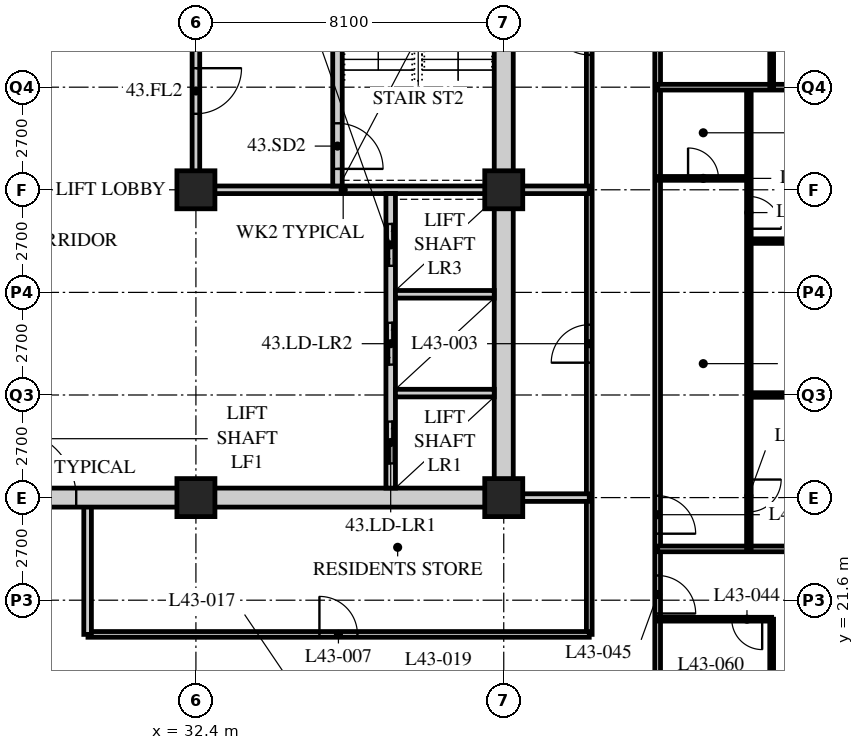
"""IFC4 building model, lengths in metres.
Left out: names, types, materials, properties, quantities, classifications, styles, units other than length and angle.
Written with IfcOpenShell. Run it as: python <this file> out.ifc"""

import sys

from ifc_helpers import new_model, si_unit, direction, frame, frame_2d, origin, origin_2d, place, context, subcontext, project, spatial, rectangle, hollow_rectangle, extrude, element, fill, save


model = new_model("IFC4")
c1 = context("Model", 3, precision=1e-05, world=origin(), true_north=direction((0.0, 1.0)))
c2 = subcontext(c1, "Body", "Model", "MODEL_VIEW")
j1 = project(units=[si_unit("LENGTHUNIT", "METRE"), si_unit("PLANEANGLEUNIT", "RADIAN")], contexts=[c1])
p1 = place(None, origin())
s1 = spatial("IfcSite", under=j1, at=p1, CompositionType="ELEMENT")
p2 = place(p1, origin())
s2 = spatial("IfcBuilding", under=s1, at=p2, CompositionType="ELEMENT")
p3 = place(p2, frame((0.0, 0.0, 170.4)))
s3 = spatial("IfcBuildingStorey", under=s2, at=p3, CompositionType="ELEMENT", Elevation=170.4)
for number, where, z_axis, x_axis in (
    (1, (32.4, 24.3, 0.0), (0.0, 0.0, 1.0), (1.0, 0.0, 0.0)),
    (2, (32.4, 32.4, 0.0), (0.0, 0.0, 1.0), (1.0, 0.0, 0.0)),
    (3, (40.5, 24.3, 0.0), (0.0, 0.0, 1.0), (1.0, 0.0, 0.0)),
    (4, (40.5, 32.4, 0.0), (0.0, 0.0, 1.0), (1.0, 0.0, 0.0)),
):
    element("IfcColumn", number, at=place(p3, frame(where, z_axis=z_axis, x_axis=x_axis)), inside=s3, PredefinedType="COLUMN", context=c2, shape_type="SweptSolid", body=[
        extrude(hollow_rectangle(XDim=1.0, YDim=1.0, WallThickness=0.1, at=origin_2d()), origin(), (0.0, 0.0, 1.0), 3.6),
    ])
p4 = place(p3, frame((44.55, 18.9, 0.0), z_axis=(0.0, 0.0, 1.0), x_axis=(0.0, 1.0, 0.0)))
e5 = element("IfcWall", 5, at=p4, inside=s3, PredefinedType="PARTITIONING", context=c2, shape_type="SweptSolid", body=[
    extrude(rectangle(XDim=24.3, YDim=0.15, at=frame_2d((12.15, 0.0))), origin(), (0.0, 0.0, 1.0), 3.39),
])
p5 = place(p4, frame((2.35, 0.0, 0.0)))
e6 = element("IfcOpeningElement", 6, at=p5, cuts=e5, PredefinedType="OPENING", context=c2, shape_type="SweptSolid", body=[
    extrude(rectangle(XDim=1.0, YDim=2.1, at=frame_2d((0.5, 1.05))), frame((0.0, 0.085, 0.0), z_axis=(0.0, -1.0, 0.0), x_axis=(1.0, 0.0, 0.0)), (0.0, 0.0, 1.0), 0.17),
])
p6 = place(p4, frame((4.45, 0.0, 0.0)))
e7 = element("IfcOpeningElement", 7, at=p6, cuts=e5, PredefinedType="OPENING", context=c2, shape_type="SweptSolid", body=[
    extrude(rectangle(XDim=1.0, YDim=2.1, at=frame_2d((0.5, 1.05))), frame((0.0, 0.085, 0.0), z_axis=(0.0, -1.0, 0.0), x_axis=(1.0, 0.0, 0.0)), (0.0, 0.0, 1.0), 0.17),
])
p7 = place(p4, frame((18.55, 0.0, 0.0)))
e8 = element("IfcOpeningElement", 8, at=p7, cuts=e5, PredefinedType="OPENING", context=c2, shape_type="SweptSolid", body=[
    extrude(rectangle(XDim=1.0, YDim=2.1, at=frame_2d((0.5, 1.05))), frame((0.0, 0.085, 0.0), z_axis=(0.0, -1.0, 0.0), x_axis=(1.0, 0.0, 0.0)), (0.0, 0.0, 1.0), 0.17),
])
p8 = place(p4, frame((22.6, 0.0, 0.0)))
e9 = element("IfcOpeningElement", 9, at=p8, cuts=e5, PredefinedType="OPENING", context=c2, shape_type="SweptSolid", body=[
    extrude(rectangle(XDim=1.0, YDim=2.1, at=frame_2d((0.5, 1.05))), frame((0.0, 0.085, 0.0), z_axis=(0.0, -1.0, 0.0), x_axis=(1.0, 0.0, 0.0)), (0.0, 0.0, 1.0), 0.17),
])
p9 = place(p3, frame((42.75, 20.7, 0.0), z_axis=(0.0, 0.0, 1.0), x_axis=(0.0, 1.0, 0.0)))
e10 = element("IfcWall", 10, at=p9, inside=s3, PredefinedType="PARTITIONING", context=c2, shape_type="SweptSolid", body=[
    extrude(rectangle(XDim=19.8, YDim=0.15, at=frame_2d((9.9, 0.0))), origin(), (0.0, 0.0, 1.0), 3.39),
])
p10 = place(p9, frame((7.15, 0.0, 0.0)))
e11 = element("IfcOpeningElement", 11, at=p10, cuts=e10, PredefinedType="OPENING", context=c2, shape_type="SweptSolid", body=[
    extrude(rectangle(XDim=1.0, YDim=2.1, at=frame_2d((0.5, 1.05))), frame((0.0, 0.085, 0.0), z_axis=(0.0, -1.0, 0.0), x_axis=(1.0, 0.0, 0.0)), (0.0, 0.0, 1.0), 0.17),
])
p11 = place(p9, frame((15.25, 0.0, 0.0)))
e12 = element("IfcOpeningElement", 12, at=p11, cuts=e10, PredefinedType="OPENING", context=c2, shape_type="SweptSolid", body=[
    extrude(rectangle(XDim=1.0, YDim=2.1, at=frame_2d((0.5, 1.05))), frame((0.0, 0.085, 0.0), z_axis=(0.0, -1.0, 0.0), x_axis=(1.0, 0.0, 0.0)), (0.0, 0.0, 1.0), 0.17),
])
p12 = place(p3, frame((29.56, 20.7, 0.0), z_axis=(0.0, 0.0, 1.0), x_axis=(1.0, 0.0, 0.0)))
e13 = element("IfcWall", 13, at=p12, inside=s3, PredefinedType="PARTITIONING", context=c2, shape_type="SweptSolid", body=[
    extrude(rectangle(XDim=13.19, YDim=0.15, at=frame_2d((6.595, 0.0))), origin(), (0.0, 0.0, 1.0), 3.39),
])
p13 = place(p12, frame((6.09, 0.0, 0.0)))
e14 = element("IfcOpeningElement", 14, at=p13, cuts=e13, PredefinedType="OPENING", context=c2, shape_type="SweptSolid", body=[
    extrude(rectangle(XDim=1.0, YDim=2.1, at=frame_2d((0.5, 1.05))), frame((0.0, 0.085, 0.0), z_axis=(0.0, -1.0, 0.0), x_axis=(1.0, 0.0, 0.0)), (0.0, 0.0, 1.0), 0.17),
])
p14 = place(p3, frame((40.5, 32.4, 0.0), z_axis=(0.0, 0.0, 1.0), x_axis=(1.0, 0.0, 0.0)))
e15 = element("IfcWall", 15, at=p14, inside=s3, PredefinedType="SOLIDWALL", context=c2, shape_type="SweptSolid", body=[
    extrude(rectangle(XDim=2.25, YDim=0.2, at=frame_2d((1.125, 0.0))), origin(), (0.0, 0.0, 1.0), 3.39),
])
p15 = place(p3, frame((29.55, 20.7, 0.0), z_axis=(0.0, 0.0, 1.0), x_axis=(0.0, 1.0, 0.0)))
e16 = element("IfcWall", 16, at=p15, inside=s3, PredefinedType="SOLIDWALL", context=c2, shape_type="SweptSolid", body=[
    extrude(rectangle(XDim=3.6, YDim=0.2, at=frame_2d((1.8, 0.0))), origin(), (0.0, 0.0, 1.0), 3.39),
])
p16 = place(p3, frame((40.5, 24.3, 0.0), z_axis=(0.0, 0.0, 1.0), x_axis=(1.0, 0.0, 0.0)))
e17 = element("IfcWall", 17, at=p16, inside=s3, PredefinedType="SOLIDWALL", context=c2, shape_type="SweptSolid", body=[
    extrude(rectangle(XDim=2.25, YDim=0.2, at=frame_2d((1.125, 0.0))), origin(), (0.0, 0.0, 1.0), 3.39),
])
p17 = place(p3, frame((47.55, 18.9, 0.0), z_axis=(0.0, 0.0, 1.0), x_axis=(0.0, 1.0, 0.0)))
e18 = element("IfcWall", 18, at=p17, inside=s3, PredefinedType="PARTITIONING", context=c2, shape_type="SweptSolid", body=[
    extrude(rectangle(XDim=2.2, YDim=0.1, at=frame_2d((1.1, 0.0))), origin(), (0.0, 0.0, 1.0), 3.39),
])
p18 = place(p3, frame((44.55, 21.1, 0.0), z_axis=(0.0, 0.0, 1.0), x_axis=(1.0, 0.0, 0.0)))
e19 = element("IfcWall", 19, at=p18, inside=s3, PredefinedType="PARTITIONING", context=c2, shape_type="SweptSolid", body=[
    extrude(rectangle(XDim=3.0, YDim=0.1, at=frame_2d((1.5, 0.0))), origin(), (0.0, 0.0, 1.0), 3.39),
])
p19 = place(p18, frame((1.95, 0.0, 0.0)))
e20 = element("IfcOpeningElement", 20, at=p19, cuts=e19, PredefinedType="OPENING", context=c2, shape_type="SweptSolid", body=[
    extrude(rectangle(XDim=0.8, YDim=2.1, at=frame_2d((0.4, 1.05))), frame((0.0, 0.06, 0.0), z_axis=(0.0, -1.0, 0.0), x_axis=(1.0, 0.0, 0.0)), (0.0, 0.0, 1.0), 0.12),
])
p20 = place(p3, frame((44.55, 22.95, 0.0), z_axis=(0.0, 0.0, 1.0), x_axis=(1.0, 0.0, 0.0)))
e21 = element("IfcWall", 21, at=p20, inside=s3, PredefinedType="PARTITIONING", context=c2, shape_type="SweptSolid", body=[
    extrude(rectangle(XDim=11.85, YDim=0.15, at=frame_2d((5.925, 0.0))), origin(), (0.0, 0.0, 1.0), 3.39),
])
p21 = place(p3, frame((46.95, 22.95, 0.0), z_axis=(0.0, 0.0, 1.0), x_axis=(0.0, 1.0, 0.0)))
e22 = element("IfcWall", 22, at=p21, inside=s3, PredefinedType="PARTITIONING", context=c2, shape_type="SweptSolid", body=[
    extrude(rectangle(XDim=12.15, YDim=0.12, at=frame_2d((6.075, 0.0))), origin(), (0.0, 0.0, 1.0), 3.39),
])
p22 = place(p21, frame((0.975, 0.0, 0.0)))
e23 = element("IfcOpeningElement", 23, at=p22, cuts=e22, PredefinedType="OPENING", context=c2, shape_type="SweptSolid", body=[
    extrude(rectangle(XDim=0.85, YDim=2.1, at=frame_2d((0.425, 1.05))), frame((0.0, 0.07, 0.0), z_axis=(0.0, -1.0, 0.0), x_axis=(1.0, 0.0, 0.0)), (0.0, 0.0, 1.0), 0.14),
])
p23 = place(p21, frame((8.425, 0.0, 0.0)))
e24 = element("IfcOpeningElement", 24, at=p23, cuts=e22, PredefinedType="OPENING", context=c2, shape_type="SweptSolid", body=[
    extrude(rectangle(XDim=0.85, YDim=2.1, at=frame_2d((0.425, 1.05))), frame((0.0, 0.07, 0.0), z_axis=(0.0, -1.0, 0.0), x_axis=(1.0, 0.0, 0.0)), (0.0, 0.0, 1.0), 0.14),
])
p24 = place(p3, frame((44.55, 32.7, 0.0), z_axis=(0.0, 0.0, 1.0), x_axis=(1.0, 0.0, 0.0)))
e25 = element("IfcWall", 25, at=p24, inside=s3, PredefinedType="PARTITIONING", context=c2, shape_type="SweptSolid", body=[
    extrude(rectangle(XDim=2.4, YDim=0.1, at=frame_2d((1.2, 0.0))), origin(), (0.0, 0.0, 1.0), 3.39),
])
p25 = place(p24, frame((0.8, 0.0, 0.0)))
e26 = element("IfcOpeningElement", 26, at=p25, cuts=e25, PredefinedType="OPENING", context=c2, shape_type="SweptSolid", body=[
    extrude(rectangle(XDim=0.8, YDim=2.1, at=frame_2d((0.4, 1.05))), frame((0.0, 0.06, 0.0), z_axis=(0.0, -1.0, 0.0), x_axis=(1.0, 0.0, 0.0)), (0.0, 0.0, 1.0), 0.12),
])
p26 = place(p3, frame((46.95, 31.05, 0.0), z_axis=(0.0, 0.0, 1.0), x_axis=(1.0, 0.0, 0.0)))
e27 = element("IfcWall", 27, at=p26, inside=s3, PredefinedType="PARTITIONING", context=c2, shape_type="SweptSolid", body=[
    extrude(rectangle(XDim=9.45, YDim=0.12, at=frame_2d((4.725, 0.0))), origin(), (0.0, 0.0, 1.0), 3.39),
])
p27 = place(p3, frame((44.55, 35.1, 0.0), z_axis=(0.0, 0.0, 1.0), x_axis=(1.0, 0.0, 0.0)))
e28 = element("IfcWall", 28, at=p27, inside=s3, PredefinedType="PARTITIONING", context=c2, shape_type="SweptSolid", body=[
    extrude(rectangle(XDim=11.85, YDim=0.15, at=frame_2d((5.925, 0.0))), origin(), (0.0, 0.0, 1.0), 2.778),
])
p28 = place(p3, frame((47.55, 35.1, 0.0), z_axis=(0.0, 0.0, 1.0), x_axis=(0.0, 1.0, 0.0)))
e29 = element("IfcWall", 29, at=p28, inside=s3, PredefinedType="PARTITIONING", context=c2, shape_type="SweptSolid", body=[
    extrude(rectangle(XDim=2.2, YDim=0.1, at=frame_2d((1.1, 0.0))), origin(), (0.0, 0.0, 1.0), 3.39),
])
p29 = place(p3, frame((46.95, 27.0, 0.0), z_axis=(0.0, 0.0, 1.0), x_axis=(1.0, 0.0, 0.0)))
e30 = element("IfcWall", 30, at=p29, inside=s3, PredefinedType="PARTITIONING", context=c2, shape_type="SweptSolid", body=[
    extrude(rectangle(XDim=1.25, YDim=0.12, at=frame_2d((0.625, 0.0))), origin(), (0.0, 0.0, 1.0), 2.778),
])
p30 = place(p3, frame((15.95, 24.3, 0.0), z_axis=(0.0, 0.0, 1.0), x_axis=(1.0, 0.0, 0.0)))
e31 = element("IfcWall", 31, at=p30, inside=s3, PredefinedType="SOLIDWALL", context=c2, shape_type="SweptSolid", body=[
    extrude(rectangle(XDim=24.8, YDim=0.5, at=frame_2d((12.4, 0.0))), origin(), (0.0, 0.0, 1.0), 2.74),
])
p31 = place(p30, frame((11.5, 0.0, 0.0)))
e32 = element("IfcOpeningElement", 32, at=p31, cuts=e31, PredefinedType="OPENING", context=c2, shape_type="SweptSolid", body=[
    extrude(rectangle(XDim=1.8, YDim=2.4, at=frame_2d((0.9, 1.2))), frame((0.0, 0.26, 0.0), z_axis=(0.0, -1.0, 0.0), x_axis=(1.0, 0.0, 0.0)), (0.0, 0.0, 1.0), 0.52),
])
p32 = place(p3, frame((40.5, 24.55, 0.0), z_axis=(0.0, 0.0, 1.0), x_axis=(0.0, 1.0, 0.0)))
e33 = element("IfcWall", 33, at=p32, inside=s3, PredefinedType="SOLIDWALL", context=c2, shape_type="SweptSolid", body=[
    extrude(rectangle(XDim=15.7, YDim=0.5, at=frame_2d((7.85, 0.0))), origin(), (0.0, 0.0, 1.0), 2.778),
])
p33 = place(p3, frame((32.3, 32.4, 0.0), z_axis=(0.0, 0.0, 1.0), x_axis=(1.0, 0.0, 0.0)))
e34 = element("IfcWall", 34, at=p33, inside=s3, PredefinedType="SOLIDWALL", context=c2, shape_type="SweptSolid", body=[
    extrude(rectangle(XDim=7.95, YDim=0.2, at=frame_2d((3.975, 0.0))), origin(), (0.0, 0.0, 1.0), 2.778),
])
p34 = place(p3, frame((32.4, 32.5, 0.0), z_axis=(0.0, 0.0, 1.0), x_axis=(0.0, 1.0, 0.0)))
e35 = element("IfcWall", 35, at=p34, inside=s3, PredefinedType="SOLIDWALL", context=c2, shape_type="SweptSolid", body=[
    extrude(rectangle(XDim=7.75, YDim=0.2, at=frame_2d((3.875, 0.0))), origin(), (0.0, 0.0, 1.0), 2.778),
])
p35 = place(p34, frame((1.9, 0.0, 0.0)))
e36 = element("IfcOpeningElement", 36, at=p35, cuts=e35, PredefinedType="OPENING", context=c2, shape_type="SweptSolid", body=[
    extrude(rectangle(XDim=1.2, YDim=2.1, at=frame_2d((0.6, 1.05))), frame((0.0, 0.11, 0.0), z_axis=(0.0, -1.0, 0.0), x_axis=(1.0, 0.0, 0.0)), (0.0, 0.0, 1.0), 0.22),
])
p36 = place(p3, frame((37.525, 24.55, 0.0), z_axis=(0.0, 0.0, 1.0), x_axis=(0.0, 1.0, 0.0)))
e37 = element("IfcWall", 37, at=p36, inside=s3, PredefinedType="SOLIDWALL", context=c2, shape_type="SweptSolid", body=[
    extrude(rectangle(XDim=7.75, YDim=0.25, at=frame_2d((3.875, 0.0))), origin(), (0.0, 0.0, 1.0), 3.39),
])
p37 = place(p36, frame((0.65, 0.0, 0.0)))
e38 = element("IfcOpeningElement", 38, at=p37, cuts=e37, PredefinedType="OPENING", context=c2, shape_type="SweptSolid", body=[
    extrude(rectangle(XDim=1.1, YDim=2.4, at=frame_2d((0.55, 1.2))), frame((0.0, 0.135, 0.0), z_axis=(0.0, -1.0, 0.0), x_axis=(1.0, 0.0, 0.0)), (0.0, 0.0, 1.0), 0.27),
])
p38 = place(p36, frame((3.25, 0.0, 0.0)))
e39 = element("IfcOpeningElement", 39, at=p38, cuts=e37, PredefinedType="OPENING", context=c2, shape_type="SweptSolid", body=[
    extrude(rectangle(XDim=1.1, YDim=2.4, at=frame_2d((0.55, 1.2))), frame((0.0, 0.135, 0.0), z_axis=(0.0, -1.0, 0.0), x_axis=(1.0, 0.0, 0.0)), (0.0, 0.0, 1.0), 0.27),
])
p39 = place(p36, frame((5.85, 0.0, 0.0)))
e40 = element("IfcOpeningElement", 40, at=p39, cuts=e37, PredefinedType="OPENING", context=c2, shape_type="SweptSolid", body=[
    extrude(rectangle(XDim=1.1, YDim=2.4, at=frame_2d((0.55, 1.2))), frame((0.0, 0.135, 0.0), z_axis=(0.0, -1.0, 0.0), x_axis=(1.0, 0.0, 0.0)), (0.0, 0.0, 1.0), 0.27),
])
for number, where, z_axis, x_axis in (
    (41, (37.65, 27.05, 0.0), (0.0, 0.0, 1.0), (1.0, 0.0, 0.0)),
    (42, (37.65, 29.65, 0.0), (0.0, 0.0, 1.0), (1.0, 0.0, 0.0)),
):
    element("IfcWall", number, at=place(p3, frame(where, z_axis=z_axis, x_axis=x_axis)), inside=s3, PredefinedType="SOLIDWALL", context=c2, shape_type="SweptSolid", body=[
        extrude(rectangle(XDim=2.6, YDim=0.2, at=frame_2d((1.3, 0.0))), origin(), (0.0, 0.0, 1.0), 3.39),
    ])
p40 = place(p3, frame((36.125, 32.5, 0.0), z_axis=(0.0, 0.0, 1.0), x_axis=(0.0, 1.0, 0.0)))
e43 = element("IfcWall", 43, at=p40, inside=s3, PredefinedType="SOLIDWALL", context=c2, shape_type="SweptSolid", body=[
    extrude(rectangle(XDim=7.75, YDim=0.25, at=frame_2d((3.875, 0.0))), origin(), (0.0, 0.0, 1.0), 3.39),
])
p41 = place(p40, frame((0.45, 0.0, 0.0)))
e44 = element("IfcOpeningElement", 44, at=p41, cuts=e43, PredefinedType="OPENING", context=c2, shape_type="SweptSolid", body=[
    extrude(rectangle(XDim=1.2, YDim=2.1, at=frame_2d((0.6, 1.05))), frame((0.0, 0.135, 0.0), z_axis=(0.0, -1.0, 0.0), x_axis=(1.0, 0.0, 0.0)), (0.0, 0.0, 1.0), 0.27),
])
p42 = place(p10, origin())
e45 = element("IfcDoor", 45, at=p42, inside=s3, OperationType="SINGLE_SWING_LEFT", PredefinedType="DOOR", context=c2, shape_type="SweptSolid", body=[
    extrude(rectangle(XDim=1.0, YDim=2.1, at=frame_2d((0.5, 1.05))), frame((0.0, 0.025, 0.0), z_axis=(0.0, -1.0, 0.0), x_axis=(1.0, 0.0, 0.0)), (0.0, 0.0, 1.0), 0.05),
])
fill(e11, e45)
p43 = place(p11, origin())
e46 = element("IfcDoor", 46, at=p43, inside=s3, OperationType="SINGLE_SWING_RIGHT", PredefinedType="DOOR", context=c2, shape_type="SweptSolid", body=[
    extrude(rectangle(XDim=1.0, YDim=2.1, at=frame_2d((0.5, 1.05))), frame((0.0, 0.025, 0.0), z_axis=(0.0, -1.0, 0.0), x_axis=(1.0, 0.0, 0.0)), (0.0, 0.0, 1.0), 0.05),
])
fill(e12, e46)
p44 = place(p13, origin())
e47 = element("IfcDoor", 47, at=p44, inside=s3, OperationType="SINGLE_SWING_LEFT", PredefinedType="DOOR", context=c2, shape_type="SweptSolid", body=[
    extrude(rectangle(XDim=1.0, YDim=2.1, at=frame_2d((0.5, 1.05))), frame((0.0, 0.025, 0.0), z_axis=(0.0, -1.0, 0.0), x_axis=(1.0, 0.0, 0.0)), (0.0, 0.0, 1.0), 0.05),
])
fill(e14, e47)
p45 = place(p19, origin())
e48 = element("IfcDoor", 48, at=p45, inside=s3, OperationType="SINGLE_SWING_LEFT", PredefinedType="DOOR", context=c2, shape_type="SweptSolid", body=[
    extrude(rectangle(XDim=0.8, YDim=2.1, at=frame_2d((0.4, 1.05))), frame((0.0, 0.025, 0.0), z_axis=(0.0, -1.0, 0.0), x_axis=(1.0, 0.0, 0.0)), (0.0, 0.0, 1.0), 0.05),
])
fill(e20, e48)
p46 = place(p5, origin())
e49 = element("IfcDoor", 49, at=p46, inside=s3, OperationType="SINGLE_SWING_RIGHT", PredefinedType="DOOR", context=c2, shape_type="SweptSolid", body=[
    extrude(rectangle(XDim=1.0, YDim=2.1, at=frame_2d((0.5, 1.05))), frame((0.0, 0.025, 0.0), z_axis=(0.0, -1.0, 0.0), x_axis=(1.0, 0.0, 0.0)), (0.0, 0.0, 1.0), 0.05),
])
fill(e6, e49)
p47 = place(p25, origin())
e50 = element("IfcDoor", 50, at=p47, inside=s3, OperationType="SINGLE_SWING_LEFT", PredefinedType="DOOR", context=c2, shape_type="SweptSolid", body=[
    extrude(rectangle(XDim=0.8, YDim=2.1, at=frame_2d((0.4, 1.05))), frame((0.0, 0.025, 0.0), z_axis=(0.0, -1.0, 0.0), x_axis=(1.0, 0.0, 0.0)), (0.0, 0.0, 1.0), 0.05),
])
fill(e26, e50)
p48 = place(p6, origin())
e51 = element("IfcDoor", 51, at=p48, inside=s3, OperationType="SINGLE_SWING_RIGHT", PredefinedType="DOOR", context=c2, shape_type="SweptSolid", body=[
    extrude(rectangle(XDim=1.0, YDim=2.1, at=frame_2d((0.5, 1.05))), frame((0.0, 0.025, 0.0), z_axis=(0.0, -1.0, 0.0), x_axis=(1.0, 0.0, 0.0)), (0.0, 0.0, 1.0), 0.05),
])
fill(e7, e51)
p49 = place(p22, origin())
e52 = element("IfcDoor", 52, at=p49, inside=s3, OperationType="SINGLE_SWING_LEFT", PredefinedType="DOOR", context=c2, shape_type="SweptSolid", body=[
    extrude(rectangle(XDim=0.85, YDim=2.1, at=frame_2d((0.425, 1.05))), frame((0.0, 0.025, 0.0), z_axis=(0.0, -1.0, 0.0), x_axis=(1.0, 0.0, 0.0)), (0.0, 0.0, 1.0), 0.05),
])
fill(e23, e52)
p50 = place(p23, origin())
e53 = element("IfcDoor", 53, at=p50, inside=s3, OperationType="SINGLE_SWING_RIGHT", PredefinedType="DOOR", context=c2, shape_type="SweptSolid", body=[
    extrude(rectangle(XDim=0.85, YDim=2.1, at=frame_2d((0.425, 1.05))), frame((0.0, 0.025, 0.0), z_axis=(0.0, -1.0, 0.0), x_axis=(1.0, 0.0, 0.0)), (0.0, 0.0, 1.0), 0.05),
])
fill(e24, e53)
p51 = place(p41, origin())
e54 = element("IfcDoor", 54, at=p51, inside=s3, OperationType="SINGLE_SWING_RIGHT", PredefinedType="DOOR", context=c2, shape_type="SweptSolid", body=[
    extrude(rectangle(XDim=1.2, YDim=2.1, at=frame_2d((0.6, 1.05))), frame((0.0, 0.025, 0.0), z_axis=(0.0, -1.0, 0.0), x_axis=(1.0, 0.0, 0.0)), (0.0, 0.0, 1.0), 0.05),
])
fill(e44, e54)
p52 = place(p35, origin())
e55 = element("IfcDoor", 55, at=p52, inside=s3, OperationType="SINGLE_SWING_LEFT", PredefinedType="DOOR", context=c2, shape_type="SweptSolid", body=[
    extrude(rectangle(XDim=1.2, YDim=2.1, at=frame_2d((0.6, 1.05))), frame((0.0, 0.025, 0.0), z_axis=(0.0, -1.0, 0.0), x_axis=(1.0, 0.0, 0.0)), (0.0, 0.0, 1.0), 0.05),
])
fill(e36, e55)
p53 = place(p37, origin())
e56 = element("IfcDoor", 56, at=p53, inside=s3, OperationType="DOUBLE_DOOR_SLIDING", PredefinedType="DOOR", context=c2, shape_type="SweptSolid", body=[
    extrude(rectangle(XDim=1.1, YDim=2.4, at=frame_2d((0.55, 1.2))), frame((0.0, 0.025, 0.0), z_axis=(0.0, -1.0, 0.0), x_axis=(1.0, 0.0, 0.0)), (0.0, 0.0, 1.0), 0.05),
])
fill(e38, e56)
p54 = place(p38, origin())
e57 = element("IfcDoor", 57, at=p54, inside=s3, OperationType="DOUBLE_DOOR_SLIDING", PredefinedType="DOOR", context=c2, shape_type="SweptSolid", body=[
    extrude(rectangle(XDim=1.1, YDim=2.4, at=frame_2d((0.55, 1.2))), frame((0.0, 0.025, 0.0), z_axis=(0.0, -1.0, 0.0), x_axis=(1.0, 0.0, 0.0)), (0.0, 0.0, 1.0), 0.05),
])
fill(e39, e57)
p55 = place(p39, origin())
e58 = element("IfcDoor", 58, at=p55, inside=s3, OperationType="DOUBLE_DOOR_SLIDING", PredefinedType="DOOR", context=c2, shape_type="SweptSolid", body=[
    extrude(rectangle(XDim=1.1, YDim=2.4, at=frame_2d((0.55, 1.2))), frame((0.0, 0.025, 0.0), z_axis=(0.0, -1.0, 0.0), x_axis=(1.0, 0.0, 0.0)), (0.0, 0.0, 1.0), 0.05),
])
fill(e40, e58)
p56 = place(p31, origin())
e59 = element("IfcDoor", 59, at=p56, inside=s3, OperationType="DOUBLE_DOOR_SINGLE_SWING", PredefinedType="DOOR", context=c2, shape_type="SweptSolid", body=[
    extrude(rectangle(XDim=1.8, YDim=2.4, at=frame_2d((0.9, 1.2))), frame((0.0, 0.025, 0.0), z_axis=(0.0, -1.0, 0.0), x_axis=(1.0, 0.0, 0.0)), (0.0, 0.0, 1.0), 0.05),
])
fill(e32, e59)
save(model, sys.argv[1])
